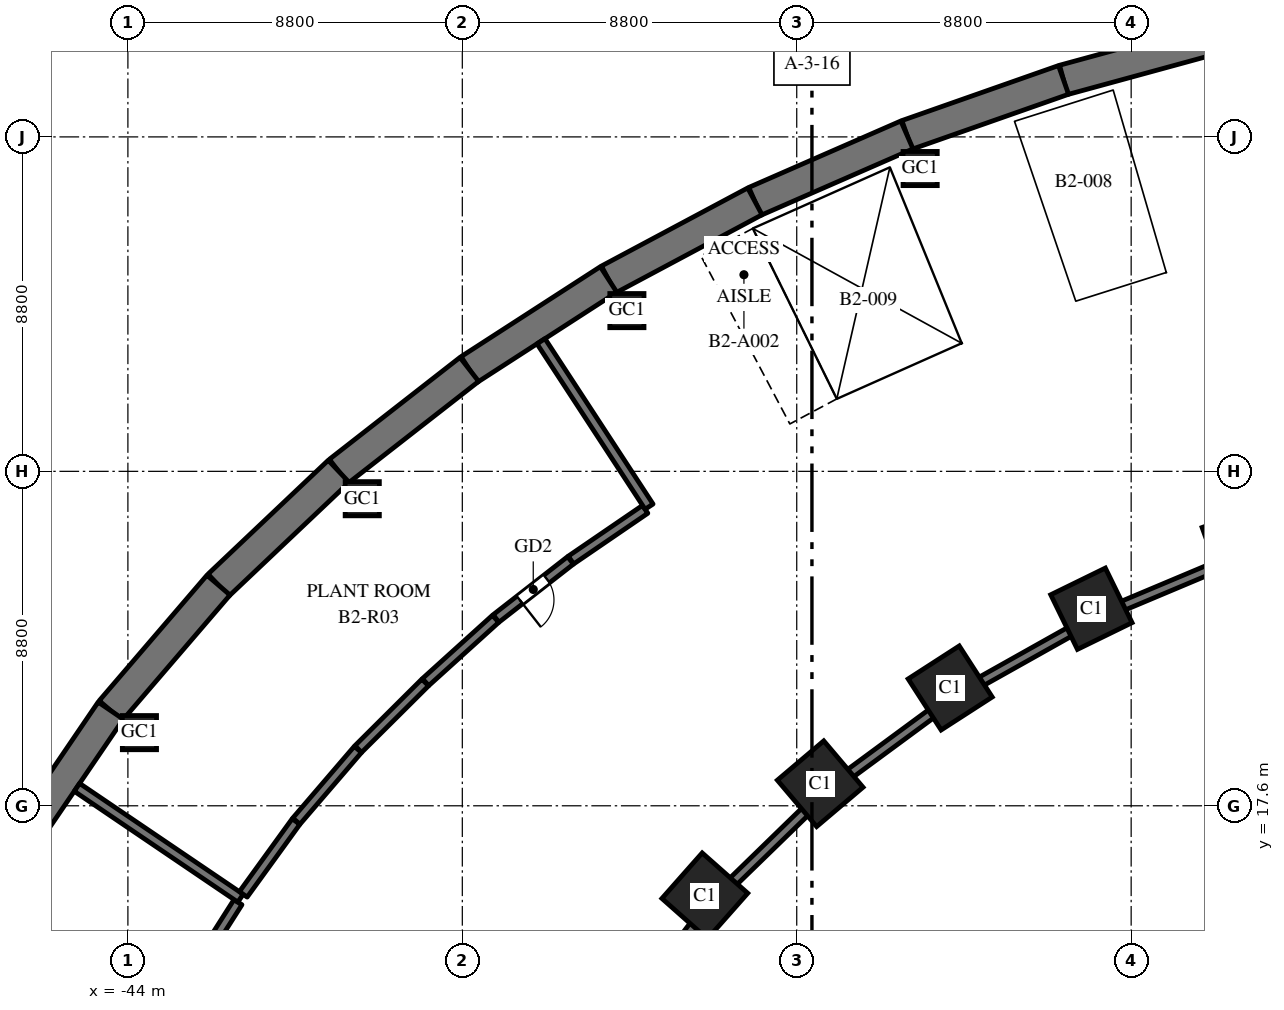
"""IFC4 building model, lengths in metres.
Left out: names, types, materials, properties, quantities, classifications, styles, units other than length and angle.
Written with IfcOpenShell. Run it as: python <this file> out.ifc"""

import sys

from ifc_helpers import new_model, si_unit, direction, frame, frame_2d, origin, origin_2d, place, context, subcontext, project, spatial, rectangle, hollow_rectangle, extrude, element, fill, save


model = new_model("IFC4")
c1 = context("Model", 3, precision=1e-05, world=origin(), true_north=direction((0.0, 1.0)))
c2 = subcontext(c1, "Body", "Model", "MODEL_VIEW")
j1 = project(units=[si_unit("LENGTHUNIT", "METRE"), si_unit("PLANEANGLEUNIT", "RADIAN")], contexts=[c1])
p1 = place(None, origin())
s1 = spatial("IfcSite", under=j1, at=p1, CompositionType="ELEMENT")
p2 = place(p1, origin())
s2 = spatial("IfcBuilding", under=s1, at=p2, CompositionType="ELEMENT")
p3 = place(p2, frame((0.0, 0.0, -8.4)))
s3 = spatial("IfcBuildingStorey", under=s2, at=p3, CompositionType="ELEMENT", Elevation=-8.4)
p4 = place(p3, frame((-15.165, 37.85, -0.3), z_axis=(0.0, 0.0, 1.0), x_axis=(-0.964679950239, -0.263424739931, 0.0)))
e1 = element("IfcWall", 1, at=p4, inside=s3, PredefinedType="SOLIDWALL", context=c2, shape_type="SweptSolid", body=[
    extrude(rectangle(XDim=4.369, YDim=0.8, at=frame_2d((2.185, 0.0))), origin(), (0.0, 0.0, 1.0), 4.5),
])
p5 = place(p3, frame((-19.379, 36.699, -0.3), z_axis=(0.0, 0.0, 1.0), x_axis=(-0.943526738033, -0.331296384853, 0.0)))
e2 = element("IfcWall", 2, at=p5, inside=s3, PredefinedType="SOLIDWALL", context=c2, shape_type="SweptSolid", body=[
    extrude(rectangle(XDim=4.368, YDim=0.8, at=frame_2d((2.184, 0.0))), origin(), (0.0, 0.0, 1.0), 4.5),
])
p6 = place(p3, frame((-23.5, 35.252, -0.3), z_axis=(0.0, 0.0, 1.0), x_axis=(-0.916336904548, -0.400408138483, 0.0)))
e3 = element("IfcWall", 3, at=p6, inside=s3, PredefinedType="SOLIDWALL", context=c2, shape_type="SweptSolid", body=[
    extrude(rectangle(XDim=4.366, YDim=0.8, at=frame_2d((2.183, 0.0))), origin(), (0.0, 0.0, 1.0), 4.5),
])
p7 = place(p3, frame((-27.501, 33.504, -0.3), z_axis=(0.0, 0.0, 1.0), x_axis=(-0.882159305704, -0.47095112205, 0.0)))
e4 = element("IfcWall", 4, at=p7, inside=s3, PredefinedType="SOLIDWALL", context=c2, shape_type="SweptSolid", body=[
    extrude(rectangle(XDim=4.365, YDim=0.8, at=frame_2d((2.182, 0.0))), origin(), (0.0, 0.0, 1.0), 4.5),
])
p8 = place(p3, frame((-31.352, 31.448, -0.3), z_axis=(0.0, 0.0, 1.0), x_axis=(-0.840047348843, -0.542513088969, 0.0)))
e5 = element("IfcWall", 5, at=p8, inside=s3, PredefinedType="SOLIDWALL", context=c2, shape_type="SweptSolid", body=[
    extrude(rectangle(XDim=4.362, YDim=0.8, at=frame_2d((2.181, 0.0))), origin(), (0.0, 0.0, 1.0), 4.5),
])
p9 = place(p3, frame((-35.016, 29.082, -0.3), z_axis=(0.0, 0.0, 1.0), x_axis=(-0.788491985196, -0.615045030288, 0.0)))
e6 = element("IfcWall", 6, at=p9, inside=s3, PredefinedType="SOLIDWALL", context=c2, shape_type="SweptSolid", body=[
    extrude(rectangle(XDim=4.359, YDim=0.8, at=frame_2d((2.18, 0.0))), origin(), (0.0, 0.0, 1.0), 4.5),
])
p10 = place(p3, frame((-38.453, 26.401, -0.3), z_axis=(0.0, 0.0, 1.0), x_axis=(-0.72620446032, -0.687478786444, 0.0)))
e7 = element("IfcWall", 7, at=p10, inside=s3, PredefinedType="SOLIDWALL", context=c2, shape_type="SweptSolid", body=[
    extrude(rectangle(XDim=4.356, YDim=0.8, at=frame_2d((2.178, 0.0))), origin(), (0.0, 0.0, 1.0), 4.5),
])
p11 = place(p3, frame((-41.617, 23.406, -0.3), z_axis=(0.0, 0.0, 1.0), x_axis=(-0.651387059497, -0.758745608699, 0.0)))
e8 = element("IfcWall", 8, at=p11, inside=s3, PredefinedType="SOLIDWALL", context=c2, shape_type="SweptSolid", body=[
    extrude(rectangle(XDim=4.353, YDim=0.8, at=frame_2d((2.176, 0.0))), origin(), (0.0, 0.0, 1.0), 4.5),
])
p12 = place(p3, frame((-44.452, 20.104, -0.3), z_axis=(0.0, 0.0, 1.0), x_axis=(-0.562667738859, -0.82668314102, 0.0)))
e9 = element("IfcWall", 9, at=p12, inside=s3, PredefinedType="SOLIDWALL", context=c2, shape_type="SweptSolid", body=[
    extrude(rectangle(XDim=4.349, YDim=0.8, at=frame_2d((2.174, 0.0))), origin(), (0.0, 0.0, 1.0), 4.5),
])
for number, where, z_axis, x_axis in (
    (10, (-14.709, 24.441, -0.3), (0.0, 0.0, 1.0), (-0.941, -0.338, 0.0)),
    (11, (-18.646, 22.785, -0.3), (0.0, 0.0, 1.0), (-0.898, -0.439, 0.0)),
    (12, (-22.362, 20.7, -0.3), (0.0, 0.0, 1.0), (-0.84, -0.542, 0.0)),
    (13, (-25.783, 18.18, -0.3), (0.0, 0.0, 1.0), (-0.763, -0.646, 0.0)),
    (14, (-28.819, 15.23, -0.3), (0.0, 0.0, 1.0), (-0.663, -0.749, 0.0)),
):
    element("IfcColumn", number, at=place(p3, frame(where, z_axis=z_axis, x_axis=x_axis)), inside=s3, PredefinedType="COLUMN", context=c2, shape_type="SweptSolid", body=[
        extrude(rectangle(XDim=1.6, YDim=1.6, at=origin_2d()), origin(), (0.0, 0.0, 1.0), 4.5),
    ])
for number, where, z_axis, x_axis in (
    (15, (-23.153, 34.368, -0.3), (0.0, 0.0, 1.0), (1.0, 0.0, 0.0)),
    (16, (-30.869, 30.629, -0.3), (0.0, 0.0, 1.0), (1.0, 0.0, 0.0)),
    (17, (-37.833, 25.68, -0.3), (0.0, 0.0, 1.0), (1.0, 0.0, 0.0)),
    (18, (-43.696, 19.525, -0.3), (0.0, 0.0, 1.0), (1.0, 0.0, 0.0)),
):
    element("IfcColumn", number, at=place(p3, frame(where, z_axis=z_axis, x_axis=x_axis)), inside=s3, PredefinedType="COLUMN", context=c2, shape_type="SweptSolid", body=[
        extrude(hollow_rectangle(XDim=0.9, YDim=0.9, WallThickness=0.045, at=origin_2d()), origin(), (0.0, 0.0, 1.0), 4.5),
    ])
p13 = place(p3, frame((-41.104, 15.063, 0.0), z_axis=(0.0, 0.0, 1.0), x_axis=(-0.536701775194, -0.843772009789, 0.0)))
e19 = element("IfcWall", 19, at=p13, inside=s3, PredefinedType="SOLIDWALL", context=c2, shape_type="SweptSolid", body=[
    extrude(rectangle(XDim=2.365, YDim=0.25, at=frame_2d((1.182, 0.0))), origin(), (0.0, 0.0, 1.0), 3.9),
])
p14 = place(p3, frame((-41.037, 15.169, 0.0), z_axis=(0.0, 0.0, 1.0), x_axis=(-0.827815300242, 0.561000738577, 0.0)))
e20 = element("IfcWall", 20, at=p14, inside=s3, PredefinedType="SOLIDWALL", context=c2, shape_type="SweptSolid", body=[
    extrude(rectangle(XDim=5.2, YDim=0.25, at=frame_2d((2.6, 0.0))), origin(), (0.0, 0.0, 1.0), 3.3),
])
p15 = place(p3, frame((-30.389, 25.4, 0.0), z_axis=(0.0, 0.0, 1.0), x_axis=(-0.825532464696, -0.564354631178, 0.0)))
e21 = element("IfcWall", 21, at=p15, inside=s3, PredefinedType="SOLIDWALL", context=c2, shape_type="SweptSolid", body=[
    extrude(rectangle(XDim=2.366, YDim=0.25, at=frame_2d((1.183, 0.0))), origin(), (0.0, 0.0, 1.0), 3.9),
])
p16 = place(p3, frame((-32.353, 24.057, 0.0), z_axis=(0.0, 0.0, 1.0), x_axis=(-0.788484208298, -0.615055000195, 0.0)))
e22 = element("IfcWall", 22, at=p16, inside=s3, PredefinedType="SOLIDWALL", context=c2, shape_type="SweptSolid", body=[
    extrude(rectangle(XDim=2.486, YDim=0.25, at=frame_2d((1.243, 0.0))), origin(), (0.0, 0.0, 1.0), 2.9),
])
p17 = place(p16, frame((0.793, 0.0, 0.0)))
e23 = element("IfcOpeningElement", 23, at=p17, cuts=e22, PredefinedType="OPENING", context=c2, shape_type="SweptSolid", body=[
    extrude(rectangle(XDim=0.9, YDim=2.1, at=frame_2d((0.45, 1.05))), frame((0.0, 0.135, 0.0), z_axis=(0.0, -1.0, 0.0), x_axis=(1.0, 0.0, 0.0)), (0.0, 0.0, 1.0), 0.27),
])
for number, where, z_axis, x_axis in (
    (24, (-34.324, 22.519, 0.0), (0.0, 0.0, 1.0), (-0.742, -0.67, 0.0)),
    (25, (-36.177, 20.844, 0.0), (0.0, 0.0, 1.0), (-0.709, -0.705, 0.0)),
):
    element("IfcWall", number, at=place(p3, frame(where, z_axis=z_axis, x_axis=x_axis)), inside=s3, PredefinedType="SOLIDWALL", context=c2, shape_type="SweptSolid", body=[
        extrude(rectangle(XDim=2.484, YDim=0.25, at=frame_2d((1.242, 0.0))), origin(), (0.0, 0.0, 1.0), 3.9),
    ])
p18 = place(p3, frame((-37.948, 19.083, 0.0), z_axis=(0.0, 0.0, 1.0), x_axis=(-0.651349194993, -0.758778113932, 0.0)))
e26 = element("IfcWall", 26, at=p18, inside=s3, PredefinedType="SOLIDWALL", context=c2, shape_type="SweptSolid", body=[
    extrude(rectangle(XDim=2.486, YDim=0.25, at=frame_2d((1.243, 0.0))), origin(), (0.0, 0.0, 1.0), 2.9),
])
p19 = place(p3, frame((-39.576, 17.185, 0.0), z_axis=(0.0, 0.0, 1.0), x_axis=(-0.586771324396, -0.809752686236, 0.0)))
e27 = element("IfcWall", 27, at=p19, inside=s3, PredefinedType="SOLIDWALL", context=c2, shape_type="SweptSolid", body=[
    extrude(rectangle(XDim=2.365, YDim=0.25, at=frame_2d((1.183, 0.0))), origin(), (0.0, 0.0, 1.0), 3.9),
])
p20 = place(p3, frame((-30.285, 25.471, 0.0), z_axis=(0.0, 0.0, 1.0), x_axis=(-0.54701658568, 0.837121768318, 0.0)))
e28 = element("IfcWall", 28, at=p20, inside=s3, PredefinedType="SOLIDWALL", context=c2, shape_type="SweptSolid", body=[
    extrude(rectangle(XDim=5.2, YDim=0.25, at=frame_2d((2.6, 0.0))), origin(), (0.0, 0.0, 1.0), 3.3),
])
p21 = place(p3, frame((-14.633, 24.202, 0.0), z_axis=(0.0, 0.0, 1.0), x_axis=(-0.921810386469, -0.387641085798, 0.0)))
e29 = element("IfcWall", 29, at=p21, inside=s3, PredefinedType="SOLIDWALL", context=c2, shape_type="SweptSolid", body=[
    extrude(rectangle(XDim=4.225, YDim=0.25, at=frame_2d((2.113, 0.0))), origin(), (0.0, 0.0, 1.0), 3.0),
])
p22 = place(p3, frame((-18.544, 22.556, 0.0), z_axis=(0.0, 0.0, 1.0), x_axis=(-0.872061015455, -0.489397165218, 0.0)))
e30 = element("IfcWall", 30, at=p22, inside=s3, PredefinedType="SOLIDWALL", context=c2, shape_type="SweptSolid", body=[
    extrude(rectangle(XDim=4.213, YDim=0.25, at=frame_2d((2.107, 0.0))), origin(), (0.0, 0.0, 1.0), 3.0),
])
p23 = place(p3, frame((-22.233, 20.484, 0.0), z_axis=(0.0, 0.0, 1.0), x_axis=(-0.805155221937, -0.593064135306, 0.0)))
e31 = element("IfcWall", 31, at=p23, inside=s3, PredefinedType="SOLIDWALL", context=c2, shape_type="SweptSolid", body=[
    extrude(rectangle(XDim=4.198, YDim=0.25, at=frame_2d((2.099, 0.0))), origin(), (0.0, 0.0, 1.0), 3.0),
])
p24 = place(p3, frame((-25.627, 17.983, 0.0), z_axis=(0.0, 0.0, 1.0), x_axis=(-0.717227656803, -0.696838925661, 0.0)))
e32 = element("IfcWall", 32, at=p24, inside=s3, PredefinedType="SOLIDWALL", context=c2, shape_type="SweptSolid", body=[
    extrude(rectangle(XDim=4.179, YDim=0.25, at=frame_2d((2.089, 0.0))), origin(), (0.0, 0.0, 1.0), 3.0),
])
p25 = place(p3, frame((-28.636, 15.057, 0.0), z_axis=(0.0, 0.0, 1.0), x_axis=(-0.604041965907, -0.796952510143, 0.0)))
e33 = element("IfcWall", 33, at=p25, inside=s3, PredefinedType="SOLIDWALL", context=c2, shape_type="SweptSolid", body=[
    extrude(rectangle(XDim=4.157, YDim=0.25, at=frame_2d((2.079, 0.0))), origin(), (0.0, 0.0, 1.0), 3.0),
])
p26 = place(p17, origin())
e34 = element("IfcDoor", 34, at=p26, inside=s3, OperationType="SINGLE_SWING_RIGHT", PredefinedType="DOOR", context=c2, shape_type="SweptSolid", body=[
    extrude(rectangle(XDim=0.9, YDim=2.1, at=frame_2d((0.45, 1.05))), frame((0.0, 0.025, 0.0), z_axis=(0.0, -1.0, 0.0), x_axis=(1.0, 0.0, 0.0)), (0.0, 0.0, 1.0), 0.05),
])
fill(e23, e34)
save(model, sys.argv[1])
